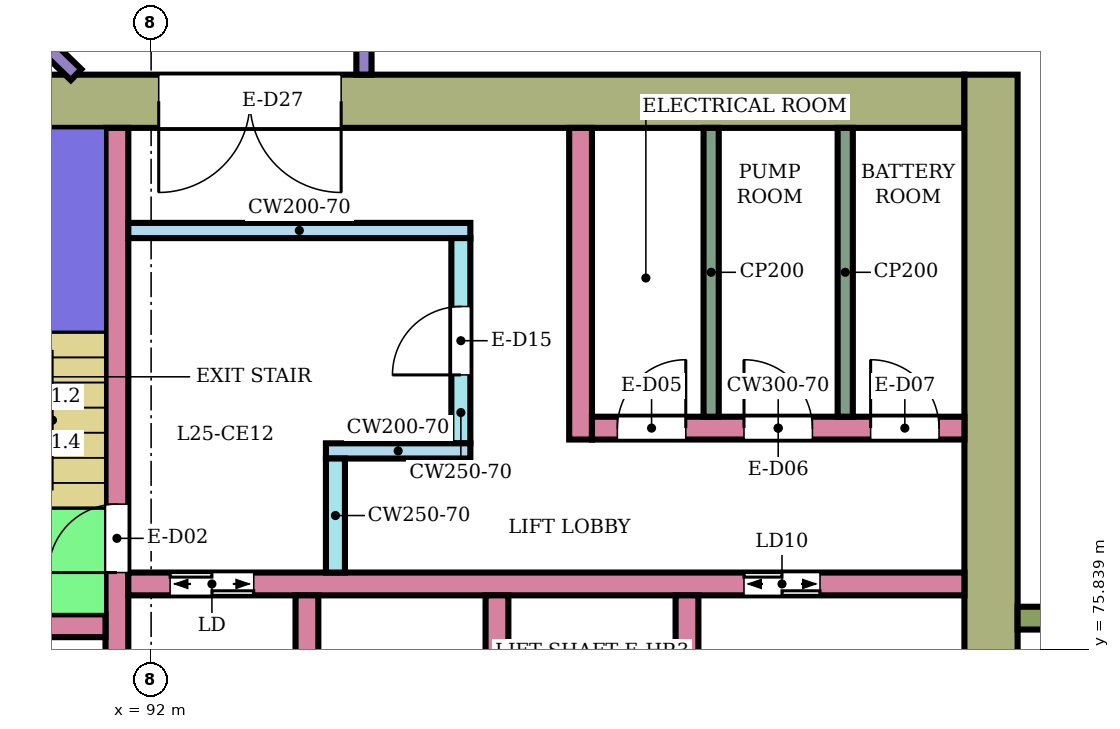
"""IFC4 building model, lengths in metres.
Left out: names, types, materials, properties, quantities, classifications, styles, units other than length and angle.
Written with IfcOpenShell. Run it as: python <this file> out.ifc"""

import sys

from ifc_helpers import new_model, si_unit, direction, frame, frame_2d, origin, place, context, subcontext, project, spatial, rectangle, extrude, element, fill, save


model = new_model("IFC4")
c1 = context("Model", 3, precision=1e-05, world=origin(), true_north=direction((0.0, 1.0)))
c2 = subcontext(c1, "Body", "Model", "MODEL_VIEW")
j1 = project(units=[si_unit("LENGTHUNIT", "METRE"), si_unit("PLANEANGLEUNIT", "RADIAN")], contexts=[c1])
p1 = place(None, origin())
s1 = spatial("IfcSite", under=j1, at=p1, CompositionType="ELEMENT")
p2 = place(p1, origin())
s2 = spatial("IfcBuilding", under=s1, at=p2, CompositionType="ELEMENT")
p3 = place(p2, frame((0.0, 0.0, 109.0)))
s3 = spatial("IfcBuildingStorey", under=s2, at=p3, CompositionType="ELEMENT", Elevation=109.0)
p4 = place(p3, frame((87.9, 83.05, 0.0), z_axis=(0.0, 0.0, 1.0), x_axis=(1.0, 0.0, 0.0)))
e1 = element("IfcWall", 1, at=p4, inside=s3, PredefinedType="SHEAR", context=c2, shape_type="SweptSolid", body=[
    extrude(rectangle(XDim=14.8, YDim=0.7, at=frame_2d((7.4, 0.0))), origin(), (0.0, 0.0, 1.0), 5.28),
])
p5 = place(p4, frame((4.2, 0.0, 0.0)))
e2 = element("IfcOpeningElement", 2, at=p5, cuts=e1, PredefinedType="OPENING", context=c2, shape_type="SweptSolid", body=[
    extrude(rectangle(XDim=2.4, YDim=2.4, at=frame_2d((1.2, 1.2))), frame((0.0, 0.36, 0.0), z_axis=(0.0, -1.0, 0.0), x_axis=(1.0, 0.0, 0.0)), (0.0, 0.0, 1.0), 0.72),
])
p6 = place(p3, frame((103.05, 66.6, 0.0), z_axis=(0.0, 0.0, 1.0), x_axis=(0.0, 1.0, 0.0)))
e3 = element("IfcWall", 3, at=p6, inside=s3, PredefinedType="SHEAR", context=c2, shape_type="SweptSolid", body=[
    extrude(rectangle(XDim=16.8, YDim=0.7, at=frame_2d((8.4, 0.0))), origin(), (0.0, 0.0, 1.0), 5.28),
])
p7 = place(p3, frame((91.55, 75.0, 0.0), z_axis=(0.0, 0.0, 1.0), x_axis=(0.0, 1.0, 0.0)))
e4 = element("IfcWall", 4, at=p7, inside=s3, PredefinedType="SHEAR", context=c2, shape_type="SweptSolid", body=[
    extrude(rectangle(XDim=7.7, YDim=0.3, at=frame_2d((3.85, 0.0))), origin(), (0.0, 0.0, 1.0), 5.28),
])
p8 = place(p7, frame((1.85, 0.0, 0.0)))
e5 = element("IfcOpeningElement", 5, at=p8, cuts=e4, PredefinedType="OPENING", context=c2, shape_type="SweptSolid", body=[
    extrude(rectangle(XDim=0.9, YDim=2.1, at=frame_2d((0.45, 1.05))), frame((0.0, 0.16, 0.0), z_axis=(0.0, -1.0, 0.0), x_axis=(1.0, 0.0, 0.0)), (0.0, 0.0, 1.0), 0.32),
])
p9 = place(p3, frame((88.35, 76.15, 0.0), z_axis=(0.0, 0.0, 1.0), x_axis=(1.0, 0.0, 0.0)))
e6 = element("IfcWall", 6, at=p9, inside=s3, PredefinedType="SHEAR", context=c2, shape_type="SweptSolid", body=[
    extrude(rectangle(XDim=3.05, YDim=0.3, at=frame_2d((1.525, 0.0))), origin(), (0.0, 0.0, 1.0), 5.28),
])
p10 = place(p9, frame((1.1, 0.0, 0.0)))
e7 = element("IfcOpeningElement", 7, at=p10, cuts=e6, PredefinedType="OPENING", context=c2, shape_type="SweptSolid", body=[
    extrude(rectangle(XDim=0.7, YDim=2.0, at=frame_2d((0.35, 1.0))), frame((0.0, 0.16, 0.0), z_axis=(0.0, -1.0, 0.0), x_axis=(1.0, 0.0, 0.0)), (0.0, 0.0, 1.0), 0.32),
])
p11 = place(p3, frame((91.7, 76.7, 0.0), z_axis=(0.0, 0.0, 1.0), x_axis=(1.0, 0.0, 0.0)))
e8 = element("IfcWall", 8, at=p11, inside=s3, PredefinedType="SHEAR", context=c2, shape_type="SweptSolid", body=[
    extrude(rectangle(XDim=11.0, YDim=0.3, at=frame_2d((5.5, 0.0))), origin(), (0.0, 0.0, 1.0), 5.28),
])
p12 = place(p11, frame((0.55, 0.0, 0.0)))
e9 = element("IfcOpeningElement", 9, at=p12, cuts=e8, PredefinedType="OPENING", context=c2, shape_type="SweptSolid", body=[
    extrude(rectangle(XDim=1.1, YDim=2.1, at=frame_2d((0.55, 1.05))), frame((0.0, 0.16, 0.0), z_axis=(0.0, -1.0, 0.0), x_axis=(1.0, 0.0, 0.0)), (0.0, 0.0, 1.0), 0.32),
])
p13 = place(p11, frame((8.1, 0.0, 0.0)))
e10 = element("IfcOpeningElement", 10, at=p13, cuts=e8, PredefinedType="OPENING", context=c2, shape_type="SweptSolid", body=[
    extrude(rectangle(XDim=1.0, YDim=2.1, at=frame_2d((0.5, 1.05))), frame((0.0, 0.16, 0.0), z_axis=(0.0, -1.0, 0.0), x_axis=(1.0, 0.0, 0.0)), (0.0, 0.0, 1.0), 0.32),
])
for number, where, z_axis, x_axis in (
    (11, (94.05, 74.0, 0.0), (0.0, 0.0, 1.0), (0.0, 1.0, 0.0)),
    (12, (96.55, 74.0, 0.0), (0.0, 0.0, 1.0), (0.0, 1.0, 0.0)),
    (13, (99.05, 74.0, 0.0), (0.0, 0.0, 1.0), (0.0, 1.0, 0.0)),
):
    element("IfcWall", number, at=place(p3, frame(where, z_axis=z_axis, x_axis=x_axis)), inside=s3, PredefinedType="SHEAR", context=c2, shape_type="SweptSolid", body=[
        extrude(rectangle(XDim=2.55, YDim=0.3, at=frame_2d((1.275, 0.0))), origin(), (0.0, 0.0, 1.0), 5.28),
    ])
p14 = place(p3, frame((91.7, 81.35, 0.0), z_axis=(0.0, 0.0, 1.0), x_axis=(1.0, 0.0, 0.0)))
e14 = element("IfcWall", 14, at=p14, inside=s3, PredefinedType="SHEAR", context=c2, shape_type="SweptSolid", body=[
    extrude(rectangle(XDim=4.5, YDim=0.2, at=frame_2d((2.25, 0.0))), origin(), (0.0, 0.0, 1.0), 5.28),
])
p15 = place(p3, frame((96.075, 78.55, 0.0), z_axis=(0.0, 0.0, 1.0), x_axis=(0.0, 1.0, 0.0)))
e15 = element("IfcWall", 15, at=p15, inside=s3, PredefinedType="SHEAR", context=c2, shape_type="SweptSolid", body=[
    extrude(rectangle(XDim=2.7, YDim=0.25, at=frame_2d((1.35, 0.0))), origin(), (0.0, 0.0, 1.0), 5.28),
])
p16 = place(p15, frame((0.9, 0.0, 0.0)))
e16 = element("IfcOpeningElement", 16, at=p16, cuts=e15, PredefinedType="OPENING", context=c2, shape_type="SweptSolid", body=[
    extrude(rectangle(XDim=0.9, YDim=2.1, at=frame_2d((0.45, 1.05))), frame((0.0, 0.135, 0.0), z_axis=(0.0, -1.0, 0.0), x_axis=(1.0, 0.0, 0.0)), (0.0, 0.0, 1.0), 0.27),
])
p17 = place(p3, frame((94.3, 78.45, 0.0), z_axis=(0.0, 0.0, 1.0), x_axis=(1.0, 0.0, 0.0)))
e17 = element("IfcWall", 17, at=p17, inside=s3, PredefinedType="SHEAR", context=c2, shape_type="SweptSolid", body=[
    extrude(rectangle(XDim=1.9, YDim=0.2, at=frame_2d((0.95, 0.0))), origin(), (0.0, 0.0, 1.0), 5.28),
])
p18 = place(p3, frame((94.425, 76.85, 0.0), z_axis=(0.0, 0.0, 1.0), x_axis=(0.0, 1.0, 0.0)))
e18 = element("IfcWall", 18, at=p18, inside=s3, PredefinedType="SHEAR", context=c2, shape_type="SweptSolid", body=[
    extrude(rectangle(XDim=1.5, YDim=0.25, at=frame_2d((0.75, 0.0))), origin(), (0.0, 0.0, 1.0), 5.28),
])
p19 = place(p3, frame((97.65, 78.6, 0.0), z_axis=(0.0, 0.0, 1.0), x_axis=(0.0, 1.0, 0.0)))
e19 = element("IfcWall", 19, at=p19, inside=s3, PredefinedType="SHEAR", context=c2, shape_type="SweptSolid", body=[
    extrude(rectangle(XDim=4.1, YDim=0.3, at=frame_2d((2.05, 0.0))), origin(), (0.0, 0.0, 1.0), 5.28),
])
p20 = place(p3, frame((97.8, 78.75, 0.0), z_axis=(0.0, 0.0, 1.0), x_axis=(1.0, 0.0, 0.0)))
e20 = element("IfcWall", 20, at=p20, inside=s3, PredefinedType="SHEAR", context=c2, shape_type="SweptSolid", body=[
    extrude(rectangle(XDim=4.9, YDim=0.3, at=frame_2d((2.45, 0.0))), origin(), (0.0, 0.0, 1.0), 5.28),
])
p21 = place(p20, frame((0.334, 0.0, 0.0)))
e21 = element("IfcOpeningElement", 21, at=p21, cuts=e20, PredefinedType="OPENING", context=c2, shape_type="SweptSolid", body=[
    extrude(rectangle(XDim=0.9, YDim=2.1, at=frame_2d((0.45, 1.05))), frame((0.0, 0.16, 0.0), z_axis=(0.0, -1.0, 0.0), x_axis=(1.0, 0.0, 0.0)), (0.0, 0.0, 1.0), 0.32),
])
p22 = place(p20, frame((2.0, 0.0, 0.0)))
e22 = element("IfcOpeningElement", 22, at=p22, cuts=e20, PredefinedType="OPENING", context=c2, shape_type="SweptSolid", body=[
    extrude(rectangle(XDim=0.9, YDim=2.1, at=frame_2d((0.45, 1.05))), frame((0.0, 0.16, 0.0), z_axis=(0.0, -1.0, 0.0), x_axis=(1.0, 0.0, 0.0)), (0.0, 0.0, 1.0), 0.32),
])
p23 = place(p20, frame((3.666, 0.0, 0.0)))
e23 = element("IfcOpeningElement", 23, at=p23, cuts=e20, PredefinedType="OPENING", context=c2, shape_type="SweptSolid", body=[
    extrude(rectangle(XDim=0.9, YDim=2.1, at=frame_2d((0.45, 1.05))), frame((0.0, 0.16, 0.0), z_axis=(0.0, -1.0, 0.0), x_axis=(1.0, 0.0, 0.0)), (0.0, 0.0, 1.0), 0.32),
])
p24 = place(p3, frame((103.4, 76.25, 0.0), z_axis=(0.0, 0.0, 1.0), x_axis=(1.0, 0.0, 0.0)))
e24 = element("IfcWall", 24, at=p24, inside=s3, PredefinedType="NOTDEFINED", context=c2, shape_type="SweptSolid", body=[
    extrude(rectangle(XDim=2.416, YDim=0.3, at=frame_2d((1.208, 0.0))), origin(), (0.0, 0.0, 1.0), 5.6),
])
p25 = place(p3, frame((87.064, 87.211, 0.0), z_axis=(0.0, 0.0, 1.0), x_axis=(0.719562412484, -0.694427774891, 0.0)))
e25 = element("IfcWall", 25, at=p25, inside=s3, PredefinedType="PARTITIONING", context=c2, shape_type="SweptSolid", body=[
    extrude(rectangle(XDim=5.488, YDim=0.2, at=frame_2d((2.744, 0.0))), origin(), (0.0, 0.0, 1.0), 5.15),
])
p26 = place(p25, frame((2.144, 0.0, 0.0)))
e26 = element("IfcOpeningElement", 26, at=p26, cuts=e25, PredefinedType="OPENING", context=c2, shape_type="SweptSolid", body=[
    extrude(rectangle(XDim=1.2, YDim=2.4, at=frame_2d((0.6, 1.2))), frame((0.0, 0.11, 0.0), z_axis=(0.0, -1.0, 0.0), x_axis=(1.0, 0.0, 0.0)), (0.0, 0.0, 1.0), 0.22),
])
p27 = place(p3, frame((94.8, 83.401, 0.0), z_axis=(0.0, 0.0, 1.0), x_axis=(0.0, 1.0, 0.0)))
e27 = element("IfcWall", 27, at=p27, inside=s3, PredefinedType="PARTITIONING", context=c2, shape_type="SweptSolid", body=[
    extrude(rectangle(XDim=1.499, YDim=0.2, at=frame_2d((0.75, 0.0))), origin(), (0.0, 0.0, 1.0), 5.15),
])
for number, where, z_axis, x_axis in (
    (28, (99.368, 78.9, 0.0), (0.0, 0.0, 1.0), (0.0, 1.0, 0.0)),
    (29, (101.132, 78.9, 0.0), (0.0, 0.0, 1.0), (0.0, 1.0, 0.0)),
):
    element("IfcWall", number, at=place(p3, frame(where, z_axis=z_axis, x_axis=x_axis)), inside=s3, PredefinedType="PARTITIONING", context=c2, shape_type="SweptSolid", body=[
        extrude(rectangle(XDim=3.8, YDim=0.2, at=frame_2d((1.9, 0.0))), origin(), (0.0, 0.0, 1.0), 5.28),
    ])
p28 = place(p8, origin())
e30 = element("IfcDoor", 30, at=p28, inside=s3, OperationType="SINGLE_SWING_LEFT", PredefinedType="DOOR", context=c2, shape_type="SweptSolid", body=[
    extrude(rectangle(XDim=0.9, YDim=2.1, at=frame_2d((0.45, 1.05))), frame((0.0, 0.025, 0.0), z_axis=(0.0, -1.0, 0.0), x_axis=(1.0, 0.0, 0.0)), (0.0, 0.0, 1.0), 0.05),
])
fill(e5, e30)
p29 = place(p12, origin())
e31 = element("IfcDoor", 31, at=p29, inside=s3, OperationType="DOUBLE_DOOR_SLIDING", PredefinedType="DOOR", context=c2, shape_type="SweptSolid", body=[
    extrude(rectangle(XDim=1.1, YDim=2.1, at=frame_2d((0.55, 1.05))), frame((0.0, 0.025, 0.0), z_axis=(0.0, -1.0, 0.0), x_axis=(1.0, 0.0, 0.0)), (0.0, 0.0, 1.0), 0.05),
])
fill(e9, e31)
p30 = place(p13, origin())
e32 = element("IfcDoor", 32, at=p30, inside=s3, OperationType="DOUBLE_DOOR_SLIDING", PredefinedType="DOOR", context=c2, shape_type="SweptSolid", body=[
    extrude(rectangle(XDim=1.0, YDim=2.1, at=frame_2d((0.5, 1.05))), frame((0.0, 0.025, 0.0), z_axis=(0.0, -1.0, 0.0), x_axis=(1.0, 0.0, 0.0)), (0.0, 0.0, 1.0), 0.05),
])
fill(e10, e32)
p31 = place(p16, origin())
e33 = element("IfcDoor", 33, at=p31, inside=s3, OperationType="SINGLE_SWING_LEFT", PredefinedType="DOOR", context=c2, shape_type="SweptSolid", body=[
    extrude(rectangle(XDim=0.9, YDim=2.1, at=frame_2d((0.45, 1.05))), frame((0.0, 0.025, 0.0), z_axis=(0.0, -1.0, 0.0), x_axis=(1.0, 0.0, 0.0)), (0.0, 0.0, 1.0), 0.05),
])
fill(e16, e33)
p32 = place(p21, origin())
e34 = element("IfcDoor", 34, at=p32, inside=s3, OperationType="SINGLE_SWING_RIGHT", PredefinedType="DOOR", context=c2, shape_type="SweptSolid", body=[
    extrude(rectangle(XDim=0.9, YDim=2.1, at=frame_2d((0.45, 1.05))), frame((0.0, 0.025, 0.0), z_axis=(0.0, -1.0, 0.0), x_axis=(1.0, 0.0, 0.0)), (0.0, 0.0, 1.0), 0.05),
])
fill(e21, e34)
p33 = place(p22, origin())
e35 = element("IfcDoor", 35, at=p33, inside=s3, OperationType="SINGLE_SWING_LEFT", PredefinedType="DOOR", context=c2, shape_type="SweptSolid", body=[
    extrude(rectangle(XDim=0.9, YDim=2.1, at=frame_2d((0.45, 1.05))), frame((0.0, 0.025, 0.0), z_axis=(0.0, -1.0, 0.0), x_axis=(1.0, 0.0, 0.0)), (0.0, 0.0, 1.0), 0.05),
])
fill(e22, e35)
p34 = place(p23, origin())
e36 = element("IfcDoor", 36, at=p34, inside=s3, OperationType="SINGLE_SWING_LEFT", PredefinedType="DOOR", context=c2, shape_type="SweptSolid", body=[
    extrude(rectangle(XDim=0.9, YDim=2.1, at=frame_2d((0.45, 1.05))), frame((0.0, 0.025, 0.0), z_axis=(0.0, -1.0, 0.0), x_axis=(1.0, 0.0, 0.0)), (0.0, 0.0, 1.0), 0.05),
])
fill(e23, e36)
p35 = place(p5, frame((2.4, 0.0, 0.0), z_axis=(0.0, 0.0, 1.0), x_axis=(-1.0, 0.0, 0.0)))
e37 = element("IfcDoor", 37, at=p35, inside=s3, OperationType="DOUBLE_DOOR_SINGLE_SWING", PredefinedType="DOOR", context=c2, shape_type="SweptSolid", body=[
    extrude(rectangle(XDim=2.4, YDim=2.4, at=frame_2d((1.2, 1.2))), frame((0.0, 0.025, 0.0), z_axis=(0.0, -1.0, 0.0), x_axis=(1.0, 0.0, 0.0)), (0.0, 0.0, 1.0), 0.05),
])
fill(e2, e37)
save(model, sys.argv[1])
